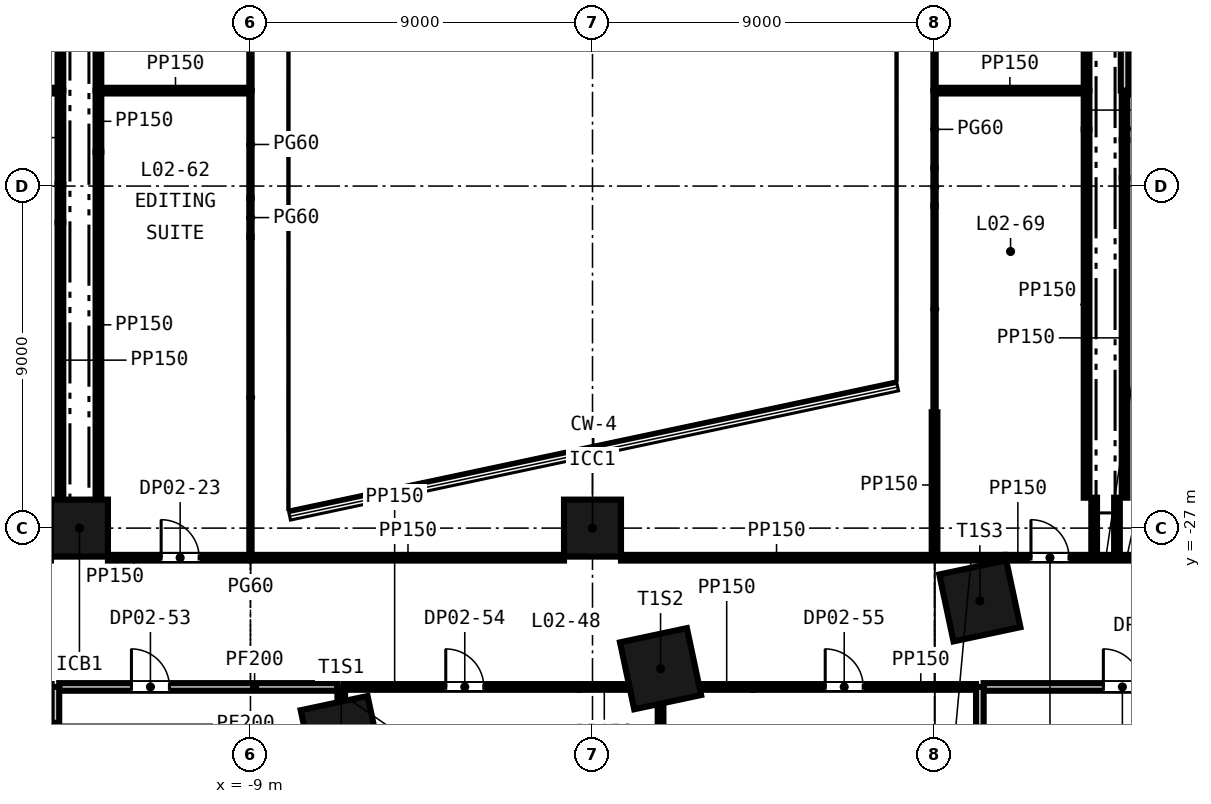
"""IFC4 building model, lengths in metres.
Left out: names, types, materials, properties, quantities, classifications, styles, units other than length and angle.
Written with IfcOpenShell. Run it as: python <this file> out.ifc"""

import sys

from ifc_helpers import new_model, si_unit, direction, frame, frame_2d, origin, origin_2d, place, context, subcontext, project, spatial, rectangle, extrude, element, fill, save


model = new_model("IFC4")
c1 = context("Model", 3, precision=1e-05, world=origin(), true_north=direction((0.0, 1.0)))
c2 = subcontext(c1, "Body", "Model", "MODEL_VIEW")
j1 = project(units=[si_unit("LENGTHUNIT", "METRE"), si_unit("PLANEANGLEUNIT", "RADIAN")], contexts=[c1])
p1 = place(None, origin())
s1 = spatial("IfcSite", under=j1, at=p1, CompositionType="ELEMENT")
p2 = place(p1, origin())
s2 = spatial("IfcBuilding", under=s1, at=p2, CompositionType="ELEMENT")
p3 = place(p2, frame((0.0, 0.0, 18.0)))
s3 = spatial("IfcBuildingStorey", under=s2, at=p3, CompositionType="ELEMENT", Elevation=18.0)
for number, where, z_axis, x_axis in (
    (1, (-6.611, -32.485, -0.4), (0.0, 0.0, 1.0), (0.978, 0.208, 0.0)),
    (2, (1.791, -30.699, -0.4), (0.0, 0.0, 1.0), (0.978, 0.208, 0.0)),
    (3, (10.192, -28.914, -0.4), (0.0, 0.0, 1.0), (0.978, 0.208, 0.0)),
):
    element("IfcColumn", number, at=place(p3, frame(where, z_axis=z_axis, x_axis=x_axis)), inside=s3, PredefinedType="COLUMN", context=c2, shape_type="SweptSolid", body=[
        extrude(rectangle(XDim=1.8, YDim=1.8, at=origin_2d()), origin(), (0.0, 0.0, 1.0), 4.6),
    ])
for number, where, z_axis, x_axis in (
    (4, (-13.5, -27.0, -0.4), (0.0, 0.0, 1.0), (1.0, 0.0, 0.0)),
    (5, (0.0, -27.0, -0.4), (0.0, 0.0, 1.0), (1.0, 0.0, 0.0)),
):
    element("IfcColumn", number, at=place(p3, frame(where, z_axis=z_axis, x_axis=x_axis)), inside=s3, PredefinedType="COLUMN", context=c2, shape_type="SweptSolid", body=[
        extrude(rectangle(XDim=1.5, YDim=1.5, at=origin_2d()), origin(), (0.0, 0.0, 1.0), 4.6),
    ])
p4 = place(p3, frame((-14.032, -31.179, 0.0), z_axis=(0.0, 0.0, 1.0), x_axis=(1.0, 0.0, 0.0)))
e6 = element("IfcWall", 6, at=p4, inside=s3, PredefinedType="PARTITIONING", context=c2, shape_type="SweptSolid", body=[
    extrude(rectangle(XDim=7.321, YDim=0.2, at=frame_2d((3.661, 0.0))), origin(), (0.0, 0.0, 1.0), 4.2),
])
p5 = place(p4, frame((1.9, 0.0, 0.0)))
e7 = element("IfcOpeningElement", 7, at=p5, cuts=e6, PredefinedType="OPENING", context=c2, shape_type="SweptSolid", body=[
    extrude(rectangle(XDim=1.0, YDim=2.1, at=frame_2d((0.5, 1.05))), frame((0.0, 0.11, 0.0), z_axis=(0.0, -1.0, 0.0), x_axis=(1.0, 0.0, 0.0)), (0.0, 0.0, 1.0), 0.22),
])
p6 = place(p3, frame((-6.511, -31.179, 0.0), z_axis=(0.0, 0.0, 1.0), x_axis=(1.0, 0.0, 0.0)))
e8 = element("IfcWall", 8, at=p6, inside=s3, PredefinedType="PARTITIONING", context=c2, shape_type="SweptSolid", body=[
    extrude(rectangle(XDim=6.165, YDim=0.15, at=frame_2d((3.083, 0.0))), origin(), (0.0, 0.0, 1.0), 4.2),
])
p7 = place(p6, frame((2.65, 0.0, 0.0)))
e9 = element("IfcOpeningElement", 9, at=p7, cuts=e8, PredefinedType="OPENING", context=c2, shape_type="SweptSolid", body=[
    extrude(rectangle(XDim=1.0, YDim=2.1, at=frame_2d((0.5, 1.05))), frame((0.0, 0.085, 0.0), z_axis=(0.0, -1.0, 0.0), x_axis=(1.0, 0.0, 0.0)), (0.0, 0.0, 1.0), 0.17),
])
p8 = place(p3, frame((-0.346, -31.179, 0.0), z_axis=(0.0, 0.0, 1.0), x_axis=(1.0, 0.0, 0.0)))
e10 = element("IfcWall", 10, at=p8, inside=s3, PredefinedType="PARTITIONING", context=c2, shape_type="SweptSolid", body=[
    extrude(rectangle(XDim=1.302, YDim=0.15, at=frame_2d((0.651, 0.0))), origin(), (0.0, 0.0, 1.0), 3.2),
])
p9 = place(p3, frame((2.829, -31.179, 0.0), z_axis=(0.0, 0.0, 1.0), x_axis=(1.0, 0.0, 0.0)))
e11 = element("IfcWall", 11, at=p9, inside=s3, PredefinedType="PARTITIONING", context=c2, shape_type="SweptSolid", body=[
    extrude(rectangle(XDim=1.395, YDim=0.15, at=frame_2d((0.697, 0.0))), origin(), (0.0, 0.0, 1.0), 3.2),
])
p10 = place(p3, frame((4.223, -31.179, 0.0), z_axis=(0.0, 0.0, 1.0), x_axis=(1.0, 0.0, 0.0)))
e12 = element("IfcWall", 12, at=p10, inside=s3, PredefinedType="PARTITIONING", context=c2, shape_type="SweptSolid", body=[
    extrude(rectangle(XDim=5.869, YDim=0.15, at=frame_2d((2.935, 0.0))), origin(), (0.0, 0.0, 1.0), 4.2),
])
p11 = place(p10, frame((1.9, 0.0, 0.0)))
e13 = element("IfcOpeningElement", 13, at=p11, cuts=e12, PredefinedType="OPENING", context=c2, shape_type="SweptSolid", body=[
    extrude(rectangle(XDim=1.0, YDim=2.1, at=frame_2d((0.5, 1.05))), frame((0.0, 0.085, 0.0), z_axis=(0.0, -1.0, 0.0), x_axis=(1.0, 0.0, 0.0)), (0.0, 0.0, 1.0), 0.17),
])
p12 = place(p3, frame((10.292, -31.179, 0.0), z_axis=(0.0, 0.0, 1.0), x_axis=(1.0, 0.0, 0.0)))
e14 = element("IfcWall", 14, at=p12, inside=s3, PredefinedType="PARTITIONING", context=c2, shape_type="SweptSolid", body=[
    extrude(rectangle(XDim=7.322, YDim=0.2, at=frame_2d((3.661, 0.0))), origin(), (0.0, 0.0, 1.0), 4.2),
])
p13 = place(p12, frame((3.15, 0.0, 0.0)))
e15 = element("IfcOpeningElement", 15, at=p13, cuts=e14, PredefinedType="OPENING", context=c2, shape_type="SweptSolid", body=[
    extrude(rectangle(XDim=1.0, YDim=2.1, at=frame_2d((0.5, 1.05))), frame((0.0, 0.11, 0.0), z_axis=(0.0, -1.0, 0.0), x_axis=(1.0, 0.0, 0.0)), (0.0, 0.0, 1.0), 0.22),
])
p14 = place(p3, frame((-12.75, -27.779, 0.0), z_axis=(0.0, 0.0, 1.0), x_axis=(1.0, 0.0, 0.0)))
e16 = element("IfcWall", 16, at=p14, inside=s3, PredefinedType="PARTITIONING", context=c2, shape_type="SweptSolid", body=[
    extrude(rectangle(XDim=3.72, YDim=0.15, at=frame_2d((1.86, 0.0))), origin(), (0.0, 0.0, 1.0), 4.2),
])
p15 = place(p14, frame((1.4, 0.0, 0.0)))
e17 = element("IfcOpeningElement", 17, at=p15, cuts=e16, PredefinedType="OPENING", context=c2, shape_type="SweptSolid", body=[
    extrude(rectangle(XDim=1.0, YDim=2.1, at=frame_2d((0.5, 1.05))), frame((0.0, 0.085, 0.0), z_axis=(0.0, -1.0, 0.0), x_axis=(1.0, 0.0, 0.0)), (0.0, 0.0, 1.0), 0.17),
])
p16 = place(p3, frame((-8.97, -27.779, 0.0), z_axis=(0.0, 0.0, 1.0), x_axis=(1.0, 0.0, 0.0)))
e18 = element("IfcWall", 18, at=p16, inside=s3, PredefinedType="PARTITIONING", context=c2, shape_type="SweptSolid", body=[
    extrude(rectangle(XDim=8.22, YDim=0.15, at=frame_2d((4.11, 0.0))), origin(), (0.0, 0.0, 1.0), 4.2),
])
p17 = place(p3, frame((0.75, -27.779, 0.0), z_axis=(0.0, 0.0, 1.0), x_axis=(1.0, 0.0, 0.0)))
e19 = element("IfcWall", 19, at=p17, inside=s3, PredefinedType="PARTITIONING", context=c2, shape_type="SweptSolid", body=[
    extrude(rectangle(XDim=8.175, YDim=0.15, at=frame_2d((4.087, 0.0))), origin(), (0.0, 0.0, 1.0), 4.2),
])
p18 = place(p3, frame((9.075, -27.779, 0.0), z_axis=(0.0, 0.0, 1.0), x_axis=(1.0, 0.0, 0.0)))
e20 = element("IfcWall", 20, at=p18, inside=s3, PredefinedType="PARTITIONING", context=c2, shape_type="SweptSolid", body=[
    extrude(rectangle(XDim=1.773, YDim=0.15, at=frame_2d((0.886, 0.0))), origin(), (0.0, 0.0, 1.0), 4.2),
])
p19 = place(p3, frame((10.887, -27.779, 0.0), z_axis=(0.0, 0.0, 1.0), x_axis=(1.0, 0.0, 0.0)))
e21 = element("IfcWall", 21, at=p19, inside=s3, PredefinedType="PARTITIONING", context=c2, shape_type="SweptSolid", body=[
    extrude(rectangle(XDim=2.238, YDim=0.15, at=frame_2d((1.119, 0.0))), origin(), (0.0, 0.0, 1.0), 4.2),
])
p20 = place(p19, frame((0.65, 0.0, 0.0)))
e22 = element("IfcOpeningElement", 22, at=p20, cuts=e21, PredefinedType="OPENING", context=c2, shape_type="SweptSolid", body=[
    extrude(rectangle(XDim=1.0, YDim=2.1, at=frame_2d((0.5, 1.05))), frame((0.0, 0.085, 0.0), z_axis=(0.0, -1.0, 0.0), x_axis=(1.0, 0.0, 0.0)), (0.0, 0.0, 1.0), 0.17),
])
p21 = place(p3, frame((13.275, -27.779, 0.0), z_axis=(0.0, 0.0, 1.0), x_axis=(1.0, 0.0, 0.0)))
e23 = element("IfcWall", 23, at=p21, inside=s3, PredefinedType="PARTITIONING", context=c2, shape_type="SweptSolid", body=[
    extrude(rectangle(XDim=0.45, YDim=0.15, at=frame_2d((0.225, 0.0))), origin(), (0.0, 0.0, 1.0), 4.2),
])
p22 = place(p3, frame((13.875, -27.779, 0.0), z_axis=(0.0, 0.0, 1.0), x_axis=(1.0, 0.0, 0.0)))
e24 = element("IfcWall", 24, at=p22, inside=s3, PredefinedType="PARTITIONING", context=c2, shape_type="SweptSolid", body=[
    extrude(rectangle(XDim=1.775, YDim=0.15, at=frame_2d((0.887, 0.0))), origin(), (0.0, 0.0, 1.0), 4.2),
])
p23 = place(p22, frame((0.4, 0.0, 0.0)))
e25 = element("IfcOpeningElement", 25, at=p23, cuts=e24, PredefinedType="OPENING", context=c2, shape_type="SweptSolid", body=[
    extrude(rectangle(XDim=1.0, YDim=2.1, at=frame_2d((0.5, 1.05))), frame((0.0, 0.085, 0.0), z_axis=(0.0, -1.0, 0.0), x_axis=(1.0, 0.0, 0.0)), (0.0, 0.0, 1.0), 0.17),
])
p24 = place(p3, frame((-21.925, -15.489, 0.0), z_axis=(0.0, 0.0, 1.0), x_axis=(1.0, 0.0, 0.0)))
e26 = element("IfcWall", 26, at=p24, inside=s3, PredefinedType="PARTITIONING", context=c2, shape_type="SweptSolid", body=[
    extrude(rectangle(XDim=7.85, YDim=0.15, at=frame_2d((3.925, 0.0))), origin(), (0.0, 0.0, 1.0), 4.2),
])
for number, where, z_axis, x_axis in (
    (27, (-12.925, -15.489, 0.0), (0.0, 0.0, 1.0), (1.0, 0.0, 0.0)),
    (28, (9.03, -15.489, 0.0), (0.0, 0.0, 1.0), (1.0, 0.0, 0.0)),
):
    element("IfcWall", number, at=place(p3, frame(where, z_axis=z_axis, x_axis=x_axis)), inside=s3, PredefinedType="PARTITIONING", context=c2, shape_type="SweptSolid", body=[
        extrude(rectangle(XDim=3.895, YDim=0.15, at=frame_2d((1.948, 0.0))), origin(), (0.0, 0.0, 1.0), 4.2),
    ])
p25 = place(p3, frame((14.1, -15.489, 0.0), z_axis=(0.0, 0.0, 1.0), x_axis=(1.0, 0.0, 0.0)))
e29 = element("IfcWall", 29, at=p25, inside=s3, PredefinedType="PARTITIONING", context=c2, shape_type="SweptSolid", body=[
    extrude(rectangle(XDim=4.44, YDim=0.2, at=frame_2d((2.22, 0.0))), origin(), (0.0, 0.0, 1.0), 4.2),
])
p26 = place(p3, frame((-14.132, -33.142, 0.0), z_axis=(0.0, 0.0, 1.0), x_axis=(0.0, 1.0, 0.0)))
e30 = element("IfcWall", 30, at=p26, inside=s3, PredefinedType="PARTITIONING", context=c2, shape_type="SweptSolid", body=[
    extrude(rectangle(XDim=1.963, YDim=0.2, at=frame_2d((0.982, 0.0))), origin(), (0.0, 0.0, 1.0), 4.2),
])
p27 = place(p3, frame((-14.0, -26.2, 0.0), z_axis=(0.0, 0.0, 1.0), x_axis=(0.0, 1.0, 0.0)))
e31 = element("IfcWall", 31, at=p27, inside=s3, PredefinedType="PARTITIONING", context=c2, shape_type="SweptSolid", body=[
    extrude(rectangle(XDim=7.239, YDim=0.15, at=frame_2d((3.62, 0.0))), origin(), (0.0, 0.0, 1.0), 4.2),
])
p28 = place(p3, frame((-14.0, -18.961, 0.0), z_axis=(0.0, 0.0, 1.0), x_axis=(0.0, 1.0, 0.0)))
e32 = element("IfcWall", 32, at=p28, inside=s3, PredefinedType="PARTITIONING", context=c2, shape_type="SweptSolid", body=[
    extrude(rectangle(XDim=1.0, YDim=0.15, at=frame_2d((0.5, 0.0))), origin(), (0.0, 0.0, 1.0), 3.521),
])
p29 = place(p3, frame((-14.0, -17.961, 0.0), z_axis=(0.0, 0.0, 1.0), x_axis=(0.0, 1.0, 0.0)))
e33 = element("IfcWall", 33, at=p29, inside=s3, PredefinedType="PARTITIONING", context=c2, shape_type="SweptSolid", body=[
    extrude(rectangle(XDim=2.47, YDim=0.15, at=frame_2d((1.235, 0.0))), origin(), (0.0, 0.0, 1.0), 4.2),
])
p30 = place(p3, frame((-14.0, -15.489, 0.0), z_axis=(0.0, 0.0, 1.0), x_axis=(0.0, 1.0, 0.0)))
e34 = element("IfcWall", 34, at=p30, inside=s3, PredefinedType="PARTITIONING", context=c2, shape_type="SweptSolid", body=[
    extrude(rectangle(XDim=5.688, YDim=0.15, at=frame_2d((2.844, 0.0))), origin(), (0.0, 0.0, 1.0), 4.2),
])
p31 = place(p3, frame((-13.0, -26.2, 0.0), z_axis=(0.0, 0.0, 1.0), x_axis=(0.0, 1.0, 0.0)))
e35 = element("IfcWall", 35, at=p31, inside=s3, PredefinedType="PARTITIONING", context=c2, shape_type="SweptSolid", body=[
    extrude(rectangle(XDim=9.098, YDim=0.15, at=frame_2d((4.549, 0.0))), origin(), (0.0, 0.0, 1.0), 4.2),
])
p32 = place(p3, frame((-13.0, -17.102, 0.0), z_axis=(0.0, 0.0, 1.0), x_axis=(0.0, 1.0, 0.0)))
e36 = element("IfcWall", 36, at=p32, inside=s3, PredefinedType="PARTITIONING", context=c2, shape_type="SweptSolid", body=[
    extrude(rectangle(XDim=1.612, YDim=0.15, at=frame_2d((0.806, 0.0))), origin(), (0.0, 0.0, 1.0), 3.749),
])
p33 = place(p3, frame((-13.0, -15.489, 0.0), z_axis=(0.0, 0.0, 1.0), x_axis=(0.0, 1.0, 0.0)))
e37 = element("IfcWall", 37, at=p33, inside=s3, PredefinedType="PARTITIONING", context=c2, shape_type="SweptSolid", body=[
    extrude(rectangle(XDim=5.688, YDim=0.15, at=frame_2d((2.844, 0.0))), origin(), (0.0, 0.0, 1.0), 4.2),
])
p34 = place(p3, frame((-9.0, -27.778, 0.0), z_axis=(0.0, 0.0, 1.0), x_axis=(0.0, 1.0, 0.0)))
e38 = element("IfcWall", 38, at=p34, inside=s3, PredefinedType="PARTITIONING", context=c2, shape_type="SweptSolid", body=[
    extrude(rectangle(XDim=8.441, YDim=0.06, at=frame_2d((4.22, 0.0))), origin(), (0.0, 0.0, 1.0), 4.2),
])
p35 = place(p3, frame((-9.0, -19.337, 0.0), z_axis=(0.0, 0.0, 1.0), x_axis=(0.0, 1.0, 0.0)))
e39 = element("IfcWall", 39, at=p35, inside=s3, PredefinedType="PARTITIONING", context=c2, shape_type="SweptSolid", body=[
    extrude(rectangle(XDim=1.016, YDim=0.06, at=frame_2d((0.508, 0.0))), origin(), (0.0, 0.0, 1.0), 3.521),
])
p36 = place(p3, frame((-9.0, -18.321, 0.0), z_axis=(0.0, 0.0, 1.0), x_axis=(0.0, 1.0, 0.0)))
e40 = element("IfcWall", 40, at=p36, inside=s3, PredefinedType="PARTITIONING", context=c2, shape_type="SweptSolid", body=[
    extrude(rectangle(XDim=2.831, YDim=0.06, at=frame_2d((1.416, 0.0))), origin(), (0.0, 0.0, 1.0), 4.2),
])
p37 = place(p3, frame((-9.0, -15.489, 0.0), z_axis=(0.0, 0.0, 1.0), x_axis=(0.0, 1.0, 0.0)))
e41 = element("IfcWall", 41, at=p37, inside=s3, PredefinedType="PARTITIONING", context=c2, shape_type="SweptSolid", body=[
    extrude(rectangle(XDim=6.488, YDim=0.06, at=frame_2d((3.244, 0.0))), origin(), (0.0, 0.0, 1.0), 4.2),
])
p38 = place(p3, frame((-6.611, -31.544, 0.0), z_axis=(0.0, 0.0, 1.0), x_axis=(0.0, 1.0, 0.0)))
e42 = element("IfcWall", 42, at=p38, inside=s3, PredefinedType="PARTITIONING", context=c2, shape_type="SweptSolid", body=[
    extrude(rectangle(XDim=0.365, YDim=0.2, at=frame_2d((0.182, 0.0))), origin(), (0.0, 0.0, 1.0), 4.2),
])
p39 = place(p3, frame((1.791, -40.4, 0.0), z_axis=(0.0, 0.0, 1.0), x_axis=(0.0, 1.0, 0.0)))
e43 = element("IfcWall", 43, at=p39, inside=s3, PredefinedType="PARTITIONING", context=c2, shape_type="SweptSolid", body=[
    extrude(rectangle(XDim=8.765, YDim=0.15, at=frame_2d((4.382, 0.0))), origin(), (0.0, 0.0, 1.0), 4.2),
])
p40 = place(p3, frame((9.0, -27.778, 0.0), z_axis=(0.0, 0.0, 1.0), x_axis=(0.0, 1.0, 0.0)))
e44 = element("IfcWall", 44, at=p40, inside=s3, PredefinedType="PARTITIONING", context=c2, shape_type="SweptSolid", body=[
    extrude(rectangle(XDim=3.825, YDim=0.15, at=frame_2d((1.913, 0.0))), origin(), (0.0, 0.0, 1.0), 4.2),
])
p41 = place(p3, frame((9.0, -23.953, 0.0), z_axis=(0.0, 0.0, 1.0), x_axis=(0.0, 1.0, 0.0)))
e45 = element("IfcWall", 45, at=p41, inside=s3, PredefinedType="PARTITIONING", context=c2, shape_type="SweptSolid", body=[
    extrude(rectangle(XDim=5.428, YDim=0.06, at=frame_2d((2.714, 0.0))), origin(), (0.0, 0.0, 1.0), 4.2),
])
p42 = place(p3, frame((9.0, -18.525, 0.0), z_axis=(0.0, 0.0, 1.0), x_axis=(0.0, 1.0, 0.0)))
e46 = element("IfcWall", 46, at=p42, inside=s3, PredefinedType="PARTITIONING", context=c2, shape_type="SweptSolid", body=[
    extrude(rectangle(XDim=1.0, YDim=0.06, at=frame_2d((0.5, 0.0))), origin(), (0.0, 0.0, 1.0), 3.451),
])
p43 = place(p3, frame((9.0, -17.525, 0.0), z_axis=(0.0, 0.0, 1.0), x_axis=(0.0, 1.0, 0.0)))
e47 = element("IfcWall", 47, at=p43, inside=s3, PredefinedType="PARTITIONING", context=c2, shape_type="SweptSolid", body=[
    extrude(rectangle(XDim=2.034, YDim=0.06, at=frame_2d((1.017, 0.0))), origin(), (0.0, 0.0, 1.0), 4.2),
])
p44 = place(p3, frame((9.0, -15.489, 0.0), z_axis=(0.0, 0.0, 1.0), x_axis=(0.0, 1.0, 0.0)))
e48 = element("IfcWall", 48, at=p44, inside=s3, PredefinedType="PARTITIONING", context=c2, shape_type="SweptSolid", body=[
    extrude(rectangle(XDim=6.488, YDim=0.06, at=frame_2d((3.244, 0.0))), origin(), (0.0, 0.0, 1.0), 4.2),
])
p45 = place(p3, frame((10.192, -40.4, 0.0), z_axis=(0.0, 0.0, 1.0), x_axis=(0.0, 1.0, 0.0)))
e49 = element("IfcWall", 49, at=p45, inside=s3, PredefinedType="PARTITIONING", context=c2, shape_type="SweptSolid", body=[
    extrude(rectangle(XDim=9.221, YDim=0.2, at=frame_2d((4.61, 0.0))), origin(), (0.0, 0.0, 1.0), 4.2),
])
p46 = place(p3, frame((13.0, -26.2, 0.0), z_axis=(0.0, 0.0, 1.0), x_axis=(0.0, 1.0, 0.0)))
e50 = element("IfcWall", 50, at=p46, inside=s3, PredefinedType="PARTITIONING", context=c2, shape_type="SweptSolid", body=[
    extrude(rectangle(XDim=9.689, YDim=0.15, at=frame_2d((4.844, 0.0))), origin(), (0.0, 0.0, 1.0), 4.2),
])
p47 = place(p3, frame((13.0, -16.511, 0.0), z_axis=(0.0, 0.0, 1.0), x_axis=(0.0, 1.0, 0.0)))
e51 = element("IfcWall", 51, at=p47, inside=s3, PredefinedType="PARTITIONING", context=c2, shape_type="SweptSolid", body=[
    extrude(rectangle(XDim=1.021, YDim=0.15, at=frame_2d((0.51, 0.0))), origin(), (0.0, 0.0, 1.0), 3.797),
])
p48 = place(p3, frame((13.0, -15.489, 0.0), z_axis=(0.0, 0.0, 1.0), x_axis=(0.0, 1.0, 0.0)))
e52 = element("IfcWall", 52, at=p48, inside=s3, PredefinedType="PARTITIONING", context=c2, shape_type="SweptSolid", body=[
    extrude(rectangle(XDim=5.688, YDim=0.15, at=frame_2d((2.844, 0.0))), origin(), (0.0, 0.0, 1.0), 4.2),
])
for number, where, z_axis, x_axis in (
    (53, (13.2, -27.778, 0.0), (0.0, 0.0, 1.0), (0.0, 1.0, 0.0)),
    (54, (13.8, -27.778, 0.0), (0.0, 0.0, 1.0), (0.0, 1.0, 0.0)),
):
    element("IfcWall", number, at=place(p3, frame(where, z_axis=z_axis, x_axis=x_axis)), inside=s3, PredefinedType="PARTITIONING", context=c2, shape_type="SweptSolid", body=[
        extrude(rectangle(XDim=1.578, YDim=0.15, at=frame_2d((0.789, 0.0))), origin(), (0.0, 0.0, 1.0), 4.2),
    ])
p49 = place(p3, frame((14.0, -26.2, 0.0), z_axis=(0.0, 0.0, 1.0), x_axis=(0.0, 1.0, 0.0)))
e55 = element("IfcWall", 55, at=p49, inside=s3, PredefinedType="PARTITIONING", context=c2, shape_type="SweptSolid", body=[
    extrude(rectangle(XDim=8.411, YDim=0.15, at=frame_2d((4.206, 0.0))), origin(), (0.0, 0.0, 1.0), 4.2),
])
p50 = place(p3, frame((14.0, -17.789, 0.0), z_axis=(0.0, 0.0, 1.0), x_axis=(0.0, 1.0, 0.0)))
e56 = element("IfcWall", 56, at=p50, inside=s3, PredefinedType="PARTITIONING", context=c2, shape_type="SweptSolid", body=[
    extrude(rectangle(XDim=1.0, YDim=0.15, at=frame_2d((0.5, 0.0))), origin(), (0.0, 0.0, 1.0), 3.111),
])
p51 = place(p3, frame((14.0, -16.789, 0.0), z_axis=(0.0, 0.0, 1.0), x_axis=(0.0, 1.0, 0.0)))
e57 = element("IfcWall", 57, at=p51, inside=s3, PredefinedType="PARTITIONING", context=c2, shape_type="SweptSolid", body=[
    extrude(rectangle(XDim=1.298, YDim=0.15, at=frame_2d((0.649, 0.0))), origin(), (0.0, 0.0, 1.0), 4.2),
])
p52 = place(p3, frame((14.0, -15.489, 0.0), z_axis=(0.0, 0.0, 1.0), x_axis=(0.0, 1.0, 0.0)))
e58 = element("IfcWall", 58, at=p52, inside=s3, PredefinedType="PARTITIONING", context=c2, shape_type="SweptSolid", body=[
    extrude(rectangle(XDim=4.607, YDim=0.2, at=frame_2d((2.303, 0.0))), origin(), (0.0, 0.0, 1.0), 4.2),
])
p53 = place(p15, origin())
e59 = element("IfcDoor", 59, at=p53, inside=s3, OperationType="SINGLE_SWING_LEFT", PredefinedType="DOOR", context=c2, shape_type="SweptSolid", body=[
    extrude(rectangle(XDim=1.0, YDim=2.1, at=frame_2d((0.5, 1.05))), frame((0.0, 0.025, 0.0), z_axis=(0.0, -1.0, 0.0), x_axis=(1.0, 0.0, 0.0)), (0.0, 0.0, 1.0), 0.05),
])
fill(e17, e59)
p54 = place(p20, origin())
e60 = element("IfcDoor", 60, at=p54, inside=s3, OperationType="SINGLE_SWING_LEFT", PredefinedType="DOOR", context=c2, shape_type="SweptSolid", body=[
    extrude(rectangle(XDim=1.0, YDim=2.1, at=frame_2d((0.5, 1.05))), frame((0.0, 0.025, 0.0), z_axis=(0.0, -1.0, 0.0), x_axis=(1.0, 0.0, 0.0)), (0.0, 0.0, 1.0), 0.05),
])
fill(e22, e60)
p55 = place(p5, origin())
e61 = element("IfcDoor", 61, at=p55, inside=s3, OperationType="SINGLE_SWING_LEFT", PredefinedType="DOOR", context=c2, shape_type="SweptSolid", body=[
    extrude(rectangle(XDim=1.0, YDim=2.1, at=frame_2d((0.5, 1.05))), frame((0.0, 0.025, 0.0), z_axis=(0.0, -1.0, 0.0), x_axis=(1.0, 0.0, 0.0)), (0.0, 0.0, 1.0), 0.05),
])
fill(e7, e61)
p56 = place(p7, origin())
e62 = element("IfcDoor", 62, at=p56, inside=s3, OperationType="SINGLE_SWING_LEFT", PredefinedType="DOOR", context=c2, shape_type="SweptSolid", body=[
    extrude(rectangle(XDim=1.0, YDim=2.1, at=frame_2d((0.5, 1.05))), frame((0.0, 0.025, 0.0), z_axis=(0.0, -1.0, 0.0), x_axis=(1.0, 0.0, 0.0)), (0.0, 0.0, 1.0), 0.05),
])
fill(e9, e62)
p57 = place(p11, origin())
e63 = element("IfcDoor", 63, at=p57, inside=s3, OperationType="SINGLE_SWING_LEFT", PredefinedType="DOOR", context=c2, shape_type="SweptSolid", body=[
    extrude(rectangle(XDim=1.0, YDim=2.1, at=frame_2d((0.5, 1.05))), frame((0.0, 0.025, 0.0), z_axis=(0.0, -1.0, 0.0), x_axis=(1.0, 0.0, 0.0)), (0.0, 0.0, 1.0), 0.05),
])
fill(e13, e63)
p58 = place(p13, origin())
e64 = element("IfcDoor", 64, at=p58, inside=s3, OperationType="SINGLE_SWING_LEFT", PredefinedType="DOOR", context=c2, shape_type="SweptSolid", body=[
    extrude(rectangle(XDim=1.0, YDim=2.1, at=frame_2d((0.5, 1.05))), frame((0.0, 0.025, 0.0), z_axis=(0.0, -1.0, 0.0), x_axis=(1.0, 0.0, 0.0)), (0.0, 0.0, 1.0), 0.05),
])
fill(e15, e64)
save(model, sys.argv[1])
